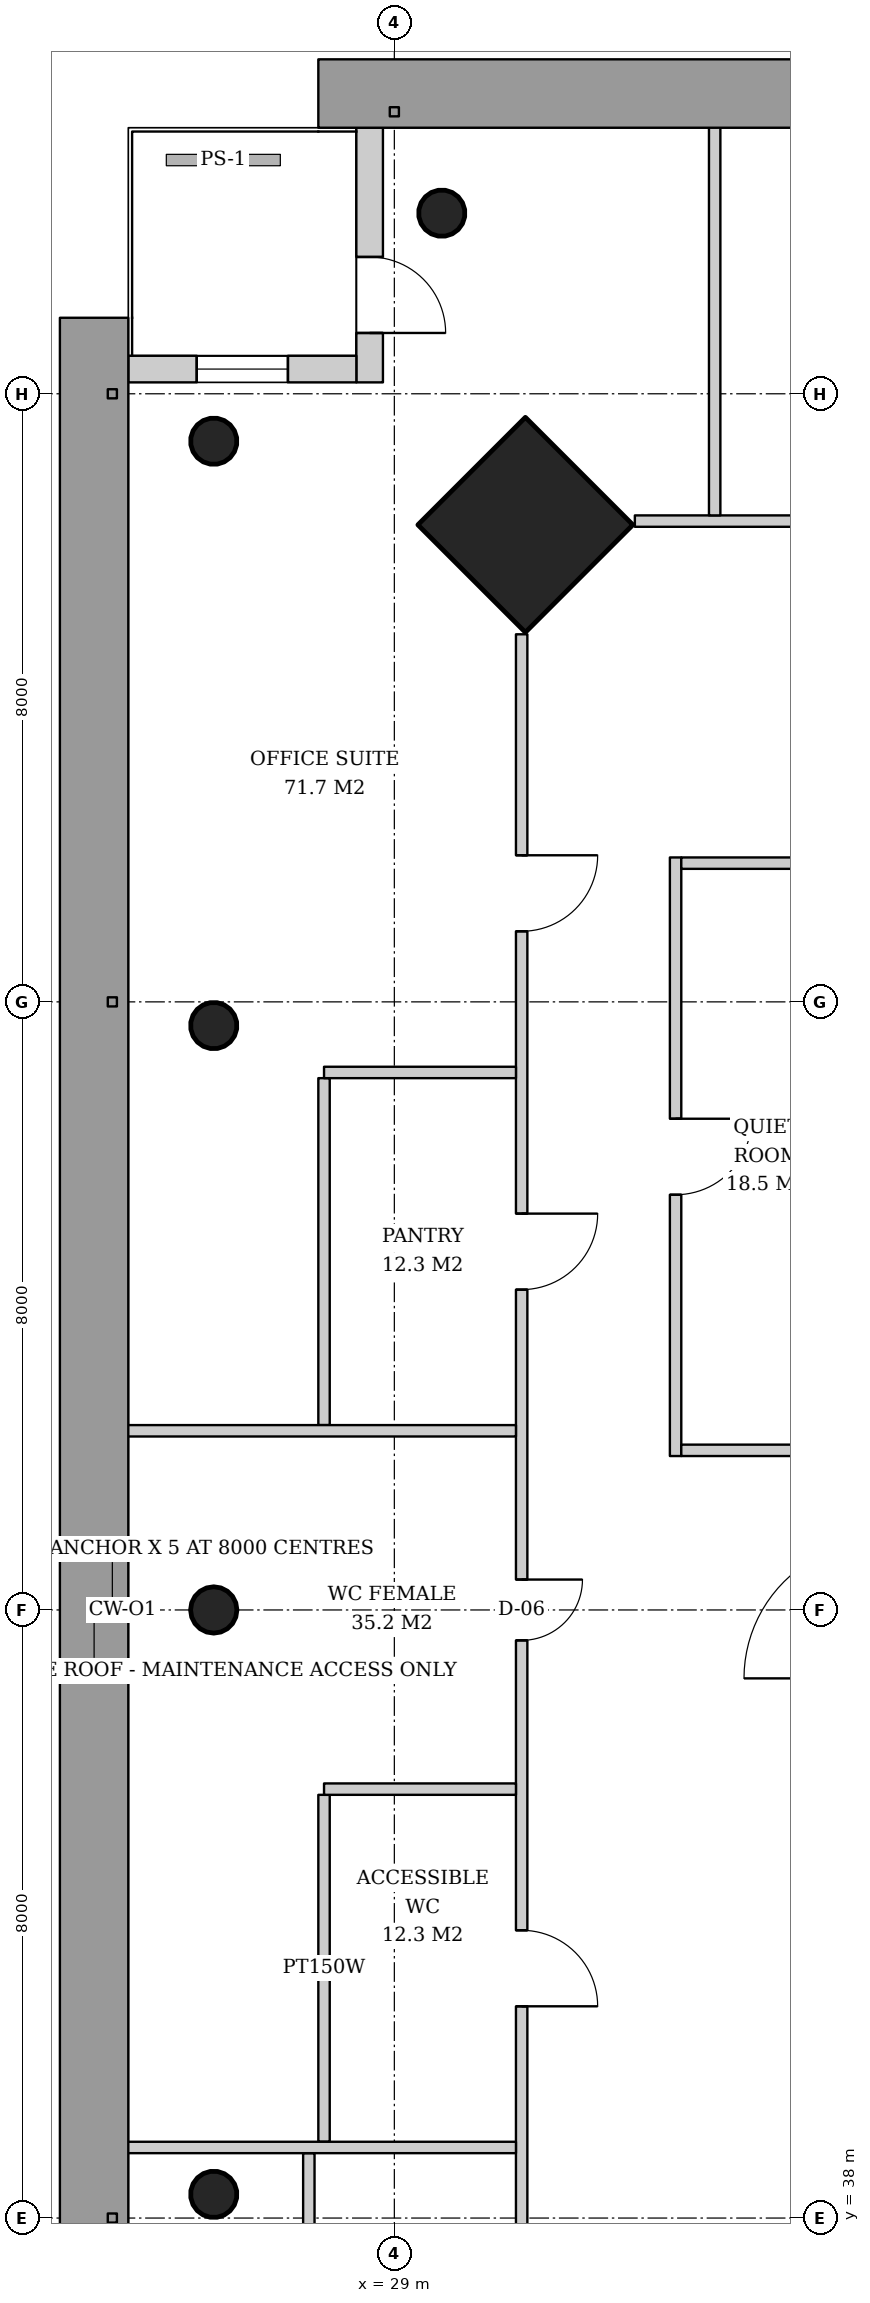
"""IFC4 building model, lengths in metres.
Left out: names, types, materials, properties, quantities, classifications, styles, units other than length and angle.
Written with IfcOpenShell. Run it as: python <this file> out.ifc"""

import sys

from ifc_helpers import new_model, si_unit, direction, frame, frame_2d, origin, origin_2d, place, context, subcontext, project, spatial, rectangle, hollow_circle, extrude, element, fill, save


model = new_model("IFC4")
c1 = context("Model", 3, precision=1e-05, world=origin(), true_north=direction((0.0, 1.0)))
c2 = subcontext(c1, "Body", "Model", "MODEL_VIEW")
j1 = project(units=[si_unit("LENGTHUNIT", "METRE"), si_unit("PLANEANGLEUNIT", "RADIAN")], contexts=[c1])
p1 = place(None, origin())
s1 = spatial("IfcSite", under=j1, at=p1, CompositionType="ELEMENT")
p2 = place(p1, origin())
s2 = spatial("IfcBuilding", under=s1, at=p2, CompositionType="ELEMENT")
p3 = place(p2, frame((0.0, 0.0, 195.8)))
s3 = spatial("IfcBuildingStorey", under=s2, at=p3, CompositionType="ELEMENT", Elevation=195.8)
p4 = place(p3, frame((30.686, 60.314, 0.0), z_axis=(0.031898107953, -0.031898107953, 0.998981992539), x_axis=(0.707106781187, 0.707106781187, 0.0)))
e1 = element("IfcColumn", 1, at=p4, inside=s3, PredefinedType="COLUMN", context=c2, shape_type="SweptSolid", body=[
    extrude(rectangle(XDim=2.0, YDim=2.0, at=origin_2d()), origin(), (0.0, 0.0, 1.0), 3.804),
])
for number, where, z_axis, x_axis in (
    (2, (29.586, 64.414, 0.0), (0.032, -0.032, 0.999), (0.707, 0.707, 0.0)),
    (3, (26.586, 61.414, 0.0), (0.032, -0.032, 0.999), (0.707, 0.707, 0.0)),
):
    element("IfcColumn", number, at=place(p3, frame(where, z_axis=z_axis, x_axis=x_axis)), inside=s3, PredefinedType="COLUMN", context=c2, shape_type="SweptSolid", body=[
        extrude(hollow_circle(Radius=0.305, WallThickness=0.025, at=origin_2d()), origin(), (0.0, 0.0, 1.0), 3.804),
    ])
p5 = place(p3, frame((26.586, 53.707, 0.0), z_axis=(0.031910302246, -0.015923048203, 0.999363892257), x_axis=(0.446493300058, 0.894786976326, 0.0)))
e4 = element("IfcColumn", 4, at=p5, inside=s3, PredefinedType="COLUMN", context=c2, shape_type="SweptSolid", body=[
    extrude(hollow_circle(Radius=0.305, WallThickness=0.025, at=origin_2d()), origin(), (0.0, 0.0, 1.0), 3.802),
])
p6 = place(p3, frame((26.586, 46.0, 0.0), z_axis=(0.031914348339, 0.0, 0.999490607445), x_axis=(0.0, 1.0, 0.0)))
e5 = element("IfcColumn", 5, at=p6, inside=s3, PredefinedType="COLUMN", context=c2, shape_type="SweptSolid", body=[
    extrude(hollow_circle(Radius=0.305, WallThickness=0.025, at=origin_2d()), origin(), (0.0, 0.0, 1.0), 3.802),
])
p7 = place(p3, frame((26.586, 38.293, 0.0), z_axis=(0.031910302246, 0.015923048203, 0.999363892257), x_axis=(-0.446493300058, 0.894786976326, 0.0)))
e6 = element("IfcColumn", 6, at=p7, inside=s3, PredefinedType="COLUMN", context=c2, shape_type="SweptSolid", body=[
    extrude(hollow_circle(Radius=0.305, WallThickness=0.025, at=origin_2d()), origin(), (0.0, 0.0, 1.0), 3.802),
])
p8 = place(p3, frame((28.675, 65.5, 0.0), z_axis=(0.0, 0.0, 1.0), x_axis=(0.0, -1.0, 0.0)))
e7 = element("IfcWall", 7, at=p8, inside=s3, PredefinedType="SOLIDWALL", context=c2, shape_type="SweptSolid", body=[
    extrude(rectangle(XDim=3.35, YDim=0.35, at=frame_2d((1.675, 0.0))), origin(), (0.0, 0.0, 1.0), 3.62),
])
p9 = place(p8, frame((1.7, 0.0, 0.0)))
e8 = element("IfcOpeningElement", 8, at=p9, cuts=e7, PredefinedType="OPENING", context=c2, shape_type="SweptSolid", body=[
    extrude(rectangle(XDim=1.0, YDim=2.4, at=frame_2d((0.5, 1.2))), frame((0.0, 0.185, 0.0), z_axis=(0.0, -1.0, 0.0), x_axis=(1.0, 0.0, 0.0)), (0.0, 0.0, 1.0), 0.37),
])
p10 = place(p3, frame((28.5, 62.325, 0.0), z_axis=(0.0, 0.0, 1.0), x_axis=(-1.0, 0.0, 0.0)))
e9 = element("IfcWall", 9, at=p10, inside=s3, PredefinedType="SOLIDWALL", context=c2, shape_type="SweptSolid", body=[
    extrude(rectangle(XDim=3.0, YDim=0.35, at=frame_2d((1.5, 0.0))), origin(), (0.0, 0.0, 1.0), 3.62),
])
p11 = place(p10, frame((0.9, 0.0, 0.6)))
e10 = element("IfcOpeningElement", 10, at=p11, cuts=e9, PredefinedType="OPENING", context=c2, shape_type="SweptSolid", body=[
    extrude(rectangle(XDim=1.2, YDim=2.55, at=frame_2d((0.6, 1.275))), frame((0.0, 0.185, 0.0), z_axis=(0.0, -1.0, 0.0), x_axis=(1.0, 0.0, 0.0)), (0.0, 0.0, 1.0), 0.37),
])
p12 = place(p3, frame((32.7, 55.9, 0.0), z_axis=(0.0, 0.0, 1.0), x_axis=(0.0, -1.0, 0.0)))
e11 = element("IfcWall", 11, at=p12, inside=s3, PredefinedType="PARTITIONING", context=c2, shape_type="SweptSolid", body=[
    extrude(rectangle(XDim=7.875, YDim=0.15, at=frame_2d((3.938, 0.0))), origin(), (0.0, 0.0, 1.0), 2.867),
])
p13 = place(p12, frame((3.438, 0.0, 0.0)))
e12 = element("IfcOpeningElement", 12, at=p13, cuts=e11, PredefinedType="OPENING", context=c2, shape_type="SweptSolid", body=[
    extrude(rectangle(XDim=1.0, YDim=2.1, at=frame_2d((0.5, 1.05))), frame((0.0, 0.085, 0.0), z_axis=(0.0, -1.0, 0.0), x_axis=(1.0, 0.0, 0.0)), (0.0, 0.0, 1.0), 0.17),
])
p14 = place(p3, frame((35.1, 55.825, 0.0), z_axis=(0.0, 0.0, 1.0), x_axis=(-1.0, 0.0, 0.0)))
e13 = element("IfcWall", 13, at=p14, inside=s3, PredefinedType="PARTITIONING", context=c2, shape_type="SweptSolid", body=[
    extrude(rectangle(XDim=2.325, YDim=0.15, at=frame_2d((1.163, 0.0))), origin(), (0.0, 0.0, 1.0), 2.867),
])
p15 = place(p3, frame((35.1, 48.1, 0.0), z_axis=(0.0, 0.0, 1.0), x_axis=(-1.0, 0.0, 0.0)))
e14 = element("IfcWall", 14, at=p15, inside=s3, PredefinedType="PARTITIONING", context=c2, shape_type="SweptSolid", body=[
    extrude(rectangle(XDim=2.325, YDim=0.15, at=frame_2d((1.163, 0.0))), origin(), (0.0, 0.0, 1.0), 3.62),
])
p16 = place(p3, frame((57.836, 60.325, 0.0), z_axis=(0.0, 0.0, 1.0), x_axis=(-1.0, 0.0, 0.0)))
e15 = element("IfcWall", 15, at=p16, inside=s3, PredefinedType="PARTITIONING", context=c2, shape_type="SweptSolid", body=[
    extrude(rectangle(XDim=25.671, YDim=0.15, at=frame_2d((12.836, 0.0))), origin(), (0.0, 0.0, 1.0), 2.867),
])
p17 = place(p16, frame((2.907, 0.0, 0.0)))
e16 = element("IfcOpeningElement", 16, at=p17, cuts=e15, PredefinedType="OPENING", context=c2, shape_type="SweptSolid", body=[
    extrude(rectangle(XDim=1.0, YDim=2.1, at=frame_2d((0.5, 1.05))), frame((0.0, 0.085, 0.0), z_axis=(0.0, -1.0, 0.0), x_axis=(1.0, 0.0, 0.0)), (0.0, 0.0, 1.0), 0.17),
])
p18 = place(p16, frame((7.622, 0.0, 0.0)))
e17 = element("IfcOpeningElement", 17, at=p18, cuts=e15, PredefinedType="OPENING", context=c2, shape_type="SweptSolid", body=[
    extrude(rectangle(XDim=1.0, YDim=2.1, at=frame_2d((0.5, 1.05))), frame((0.0, 0.085, 0.0), z_axis=(0.0, -1.0, 0.0), x_axis=(1.0, 0.0, 0.0)), (0.0, 0.0, 1.0), 0.17),
])
p19 = place(p16, frame((12.336, 0.0, 0.0)))
e18 = element("IfcOpeningElement", 18, at=p19, cuts=e15, PredefinedType="OPENING", context=c2, shape_type="SweptSolid", body=[
    extrude(rectangle(XDim=1.0, YDim=2.1, at=frame_2d((0.5, 1.05))), frame((0.0, 0.085, 0.0), z_axis=(0.0, -1.0, 0.0), x_axis=(1.0, 0.0, 0.0)), (0.0, 0.0, 1.0), 0.17),
])
p20 = place(p16, frame((17.05, 0.0, 0.0)))
e19 = element("IfcOpeningElement", 19, at=p20, cuts=e15, PredefinedType="OPENING", context=c2, shape_type="SweptSolid", body=[
    extrude(rectangle(XDim=1.0, YDim=2.1, at=frame_2d((0.5, 1.05))), frame((0.0, 0.085, 0.0), z_axis=(0.0, -1.0, 0.0), x_axis=(1.0, 0.0, 0.0)), (0.0, 0.0, 1.0), 0.17),
])
p21 = place(p16, frame((21.764, 0.0, 0.0)))
e20 = element("IfcOpeningElement", 20, at=p21, cuts=e15, PredefinedType="OPENING", context=c2, shape_type="SweptSolid", body=[
    extrude(rectangle(XDim=1.0, YDim=2.1, at=frame_2d((0.5, 1.05))), frame((0.0, 0.085, 0.0), z_axis=(0.0, -1.0, 0.0), x_axis=(1.0, 0.0, 0.0)), (0.0, 0.0, 1.0), 0.17),
])
p22 = place(p3, frame((33.214, 60.4, 0.0), z_axis=(0.0, 0.0, 1.0), x_axis=(0.0, 1.0, 0.0)))
e21 = element("IfcWall", 21, at=p22, inside=s3, PredefinedType="PARTITIONING", context=c2, shape_type="SweptSolid", body=[
    extrude(rectangle(XDim=5.14, YDim=0.15, at=frame_2d((2.57, 0.0))), origin(), (0.0, 0.0, 1.0), 3.12),
])
for number, where, z_axis, x_axis in (
    (22, (28.075, 52.996, 0.0), (0.0, 0.0, 1.0), (0.0, -1.0, 0.0)),
    (23, (28.075, 43.568, 0.0), (0.0, 0.0, 1.0), (0.0, -1.0, 0.0)),
    (24, (27.875, 38.854, 0.0), (0.0, 0.0, 1.0), (0.0, -1.0, 0.0)),
):
    element("IfcWall", number, at=place(p3, frame(where, z_axis=z_axis, x_axis=x_axis)), inside=s3, PredefinedType="PARTITIONING", context=c2, shape_type="SweptSolid", body=[
        extrude(rectangle(XDim=4.564, YDim=0.15, at=frame_2d((2.282, 0.0))), origin(), (0.0, 0.0, 1.0), 2.867),
    ])
p23 = place(p3, frame((30.675, 58.836, 0.0), z_axis=(0.0, 0.0, 1.0), x_axis=(0.0, -1.0, 0.0)))
e25 = element("IfcWall", 25, at=p23, inside=s3, PredefinedType="PARTITIONING", context=c2, shape_type="SweptSolid", body=[
    extrude(rectangle(XDim=25.671, YDim=0.15, at=frame_2d((12.836, 0.0))), origin(), (0.0, 0.0, 1.0), 2.867),
])
p24 = place(p23, frame((2.907, 0.0, 0.0)))
e26 = element("IfcOpeningElement", 26, at=p24, cuts=e25, PredefinedType="OPENING", context=c2, shape_type="SweptSolid", body=[
    extrude(rectangle(XDim=1.0, YDim=2.1, at=frame_2d((0.5, 1.05))), frame((0.0, 0.085, 0.0), z_axis=(0.0, -1.0, 0.0), x_axis=(1.0, 0.0, 0.0)), (0.0, 0.0, 1.0), 0.17),
])
p25 = place(p23, frame((7.622, 0.0, 0.0)))
e27 = element("IfcOpeningElement", 27, at=p25, cuts=e25, PredefinedType="OPENING", context=c2, shape_type="SweptSolid", body=[
    extrude(rectangle(XDim=1.0, YDim=2.1, at=frame_2d((0.5, 1.05))), frame((0.0, 0.085, 0.0), z_axis=(0.0, -1.0, 0.0), x_axis=(1.0, 0.0, 0.0)), (0.0, 0.0, 1.0), 0.17),
])
p26 = place(p23, frame((12.436, 0.0, 0.0)))
e28 = element("IfcOpeningElement", 28, at=p26, cuts=e25, PredefinedType="OPENING", context=c2, shape_type="SweptSolid", body=[
    extrude(rectangle(XDim=0.8, YDim=2.1, at=frame_2d((0.4, 1.05))), frame((0.0, 0.085, 0.0), z_axis=(0.0, -1.0, 0.0), x_axis=(1.0, 0.0, 0.0)), (0.0, 0.0, 1.0), 0.17),
])
p27 = place(p23, frame((17.05, 0.0, 0.0)))
e29 = element("IfcOpeningElement", 29, at=p27, cuts=e25, PredefinedType="OPENING", context=c2, shape_type="SweptSolid", body=[
    extrude(rectangle(XDim=1.0, YDim=2.1, at=frame_2d((0.5, 1.05))), frame((0.0, 0.085, 0.0), z_axis=(0.0, -1.0, 0.0), x_axis=(1.0, 0.0, 0.0)), (0.0, 0.0, 1.0), 0.17),
])
p28 = place(p23, frame((21.864, 0.0, 0.0)))
e30 = element("IfcOpeningElement", 30, at=p28, cuts=e25, PredefinedType="OPENING", context=c2, shape_type="SweptSolid", body=[
    extrude(rectangle(XDim=0.8, YDim=2.1, at=frame_2d((0.4, 1.05))), frame((0.0, 0.085, 0.0), z_axis=(0.0, -1.0, 0.0), x_axis=(1.0, 0.0, 0.0)), (0.0, 0.0, 1.0), 0.17),
])
p29 = place(p3, frame((30.6, 53.072, 0.0), z_axis=(0.0, 0.0, 1.0), x_axis=(-1.0, 0.0, 0.0)))
e31 = element("IfcWall", 31, at=p29, inside=s3, PredefinedType="PARTITIONING", context=c2, shape_type="SweptSolid", body=[
    extrude(rectangle(XDim=2.525, YDim=0.15, at=frame_2d((1.263, 0.0))), origin(), (0.0, 0.0, 1.0), 3.62),
])
p30 = place(p3, frame((30.6, 48.357, 0.0), z_axis=(0.0, 0.0, 1.0), x_axis=(-1.0, 0.0, 0.0)))
e32 = element("IfcWall", 32, at=p30, inside=s3, PredefinedType="PARTITIONING", context=c2, shape_type="SweptSolid", body=[
    extrude(rectangle(XDim=5.14, YDim=0.15, at=frame_2d((2.57, 0.0))), origin(), (0.0, 0.0, 1.0), 3.12),
])
p31 = place(p3, frame((30.6, 43.643, 0.0), z_axis=(0.0, 0.0, 1.0), x_axis=(-1.0, 0.0, 0.0)))
e33 = element("IfcWall", 33, at=p31, inside=s3, PredefinedType="PARTITIONING", context=c2, shape_type="SweptSolid", body=[
    extrude(rectangle(XDim=2.525, YDim=0.15, at=frame_2d((1.263, 0.0))), origin(), (0.0, 0.0, 1.0), 2.867),
])
p32 = place(p3, frame((30.6, 38.928, 0.0), z_axis=(0.0, 0.0, 1.0), x_axis=(-1.0, 0.0, 0.0)))
e34 = element("IfcWall", 34, at=p32, inside=s3, PredefinedType="PARTITIONING", context=c2, shape_type="SweptSolid", body=[
    extrude(rectangle(XDim=5.14, YDim=0.15, at=frame_2d((2.57, 0.0))), origin(), (0.0, 0.0, 1.0), 3.12),
])
p33 = place(p9, origin())
e35 = element("IfcDoor", 35, at=p33, inside=s3, OperationType="SINGLE_SWING_RIGHT", PredefinedType="DOOR", context=c2, shape_type="SweptSolid", body=[
    extrude(rectangle(XDim=1.0, YDim=2.4, at=frame_2d((0.5, 1.2))), frame((0.0, 0.025, 0.0), z_axis=(0.0, -1.0, 0.0), x_axis=(1.0, 0.0, 0.0)), (0.0, 0.0, 1.0), 0.05),
])
fill(e8, e35)
p34 = place(p11, origin())
e36 = element("IfcWindow", 36, at=p34, inside=s3, PartitioningType="SINGLE_PANEL", PredefinedType="WINDOW", context=c2, shape_type="SweptSolid", body=[
    extrude(rectangle(XDim=1.2, YDim=2.55, at=frame_2d((0.6, 1.275))), frame((0.0, 0.03, 0.0), z_axis=(0.0, -1.0, 0.0), x_axis=(1.0, 0.0, 0.0)), (0.0, 0.0, 1.0), 0.06),
])
fill(e10, e36)
p35 = place(p13, origin())
e37 = element("IfcDoor", 37, at=p35, inside=s3, OperationType="SINGLE_SWING_LEFT", PredefinedType="DOOR", context=c2, shape_type="SweptSolid", body=[
    extrude(rectangle(XDim=1.0, YDim=2.1, at=frame_2d((0.5, 1.05))), frame((0.0, 0.025, 0.0), z_axis=(0.0, -1.0, 0.0), x_axis=(1.0, 0.0, 0.0)), (0.0, 0.0, 1.0), 0.05),
])
fill(e12, e37)
p36 = place(p24, origin())
e38 = element("IfcDoor", 38, at=p36, inside=s3, OperationType="SINGLE_SWING_LEFT", PredefinedType="DOOR", context=c2, shape_type="SweptSolid", body=[
    extrude(rectangle(XDim=1.0, YDim=2.1, at=frame_2d((0.5, 1.05))), frame((0.0, 0.025, 0.0), z_axis=(0.0, -1.0, 0.0), x_axis=(1.0, 0.0, 0.0)), (0.0, 0.0, 1.0), 0.05),
])
fill(e26, e38)
p37 = place(p25, origin())
e39 = element("IfcDoor", 39, at=p37, inside=s3, OperationType="SINGLE_SWING_LEFT", PredefinedType="DOOR", context=c2, shape_type="SweptSolid", body=[
    extrude(rectangle(XDim=1.0, YDim=2.1, at=frame_2d((0.5, 1.05))), frame((0.0, 0.025, 0.0), z_axis=(0.0, -1.0, 0.0), x_axis=(1.0, 0.0, 0.0)), (0.0, 0.0, 1.0), 0.05),
])
fill(e27, e39)
p38 = place(p26, origin())
e40 = element("IfcDoor", 40, at=p38, inside=s3, OperationType="SINGLE_SWING_LEFT", PredefinedType="DOOR", context=c2, shape_type="SweptSolid", body=[
    extrude(rectangle(XDim=0.8, YDim=2.1, at=frame_2d((0.4, 1.05))), frame((0.0, 0.025, 0.0), z_axis=(0.0, -1.0, 0.0), x_axis=(1.0, 0.0, 0.0)), (0.0, 0.0, 1.0), 0.05),
])
fill(e28, e40)
p39 = place(p27, origin())
e41 = element("IfcDoor", 41, at=p39, inside=s3, OperationType="SINGLE_SWING_RIGHT", PredefinedType="DOOR", context=c2, shape_type="SweptSolid", body=[
    extrude(rectangle(XDim=1.0, YDim=2.1, at=frame_2d((0.5, 1.05))), frame((0.0, 0.025, 0.0), z_axis=(0.0, -1.0, 0.0), x_axis=(1.0, 0.0, 0.0)), (0.0, 0.0, 1.0), 0.05),
])
fill(e29, e41)
save(model, sys.argv[1])
